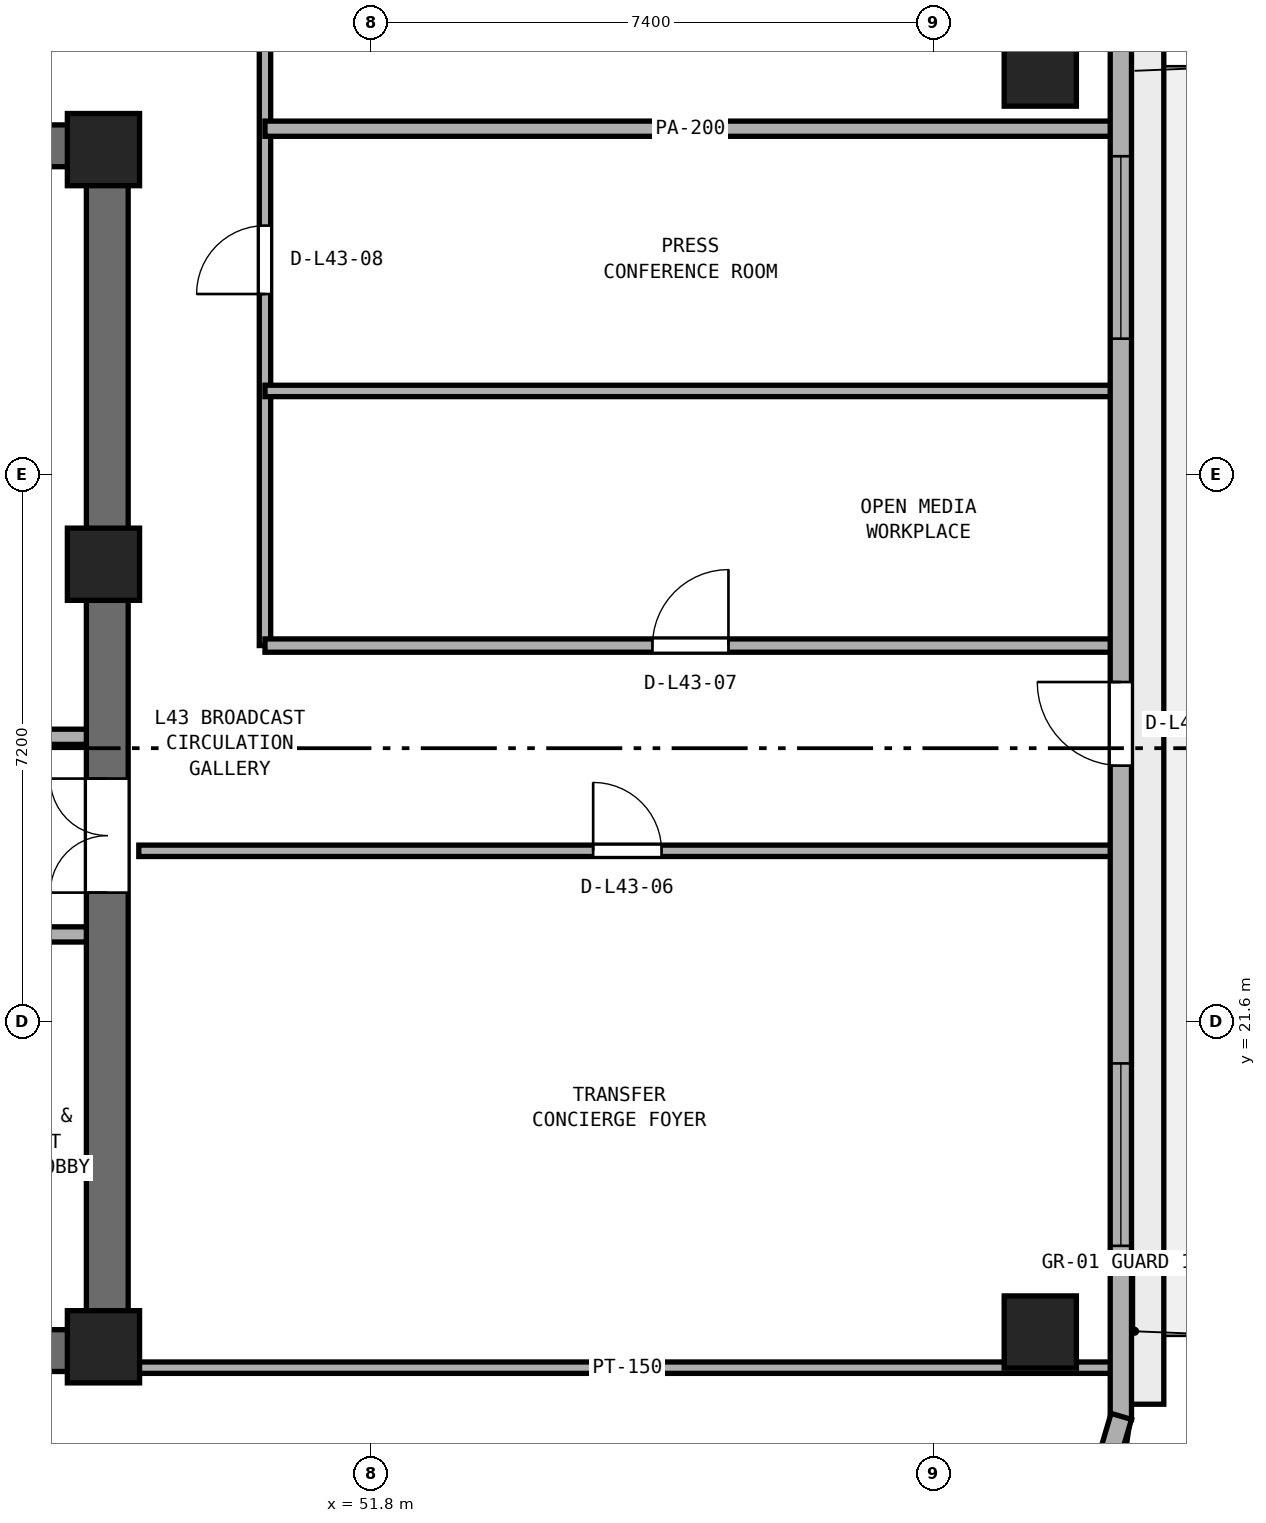
"""IFC4 building model, lengths in metres.
Left out: names, types, materials, properties, quantities, classifications, styles, units other than length and angle.
Written with IfcOpenShell. Run it as: python <this file> out.ifc"""

import sys

from ifc_helpers import new_model, si_unit, direction, frame, frame_2d, origin, origin_2d, place, context, subcontext, project, spatial, rectangle, extrude, element, fill, save


model = new_model("IFC4")
c1 = context("Model", 3, precision=1e-05, world=origin(), true_north=direction((0.0, 1.0)))
c2 = subcontext(c1, "Body", "Model", "MODEL_VIEW")
j1 = project(units=[si_unit("LENGTHUNIT", "METRE"), si_unit("PLANEANGLEUNIT", "RADIAN")], contexts=[c1])
p1 = place(None, origin())
s1 = spatial("IfcSite", under=j1, at=p1, CompositionType="ELEMENT")
p2 = place(p1, origin())
s2 = spatial("IfcBuilding", under=s1, at=p2, CompositionType="ELEMENT")
p3 = place(p2, frame((0.0, 0.0, 170.6)))
s3 = spatial("IfcBuildingStorey", under=s2, at=p3, CompositionType="ELEMENT", Elevation=170.6)
for number, where, z_axis, x_axis in (
    (1, (25.4, 17.275, 0.0), (0.0, 0.0, 1.0), (1.0, 0.0, 0.0)),
    (2, (25.4, 33.125, 0.0), (0.0, 0.0, 1.0), (1.0, 0.0, 0.0)),
):
    element("IfcWall", number, at=place(p3, frame(where, z_axis=z_axis, x_axis=x_axis)), inside=s3, PredefinedType="SHEAR", context=c2, shape_type="SweptSolid", body=[
        extrude(rectangle(XDim=23.2, YDim=0.55, at=frame_2d((11.6, 0.0))), origin(), (0.0, 0.0, 1.0), 3.54),
    ])
p4 = place(p3, frame((48.325, 17.55, 0.0), z_axis=(0.0, 0.0, 1.0), x_axis=(0.0, 1.0, 0.0)))
e3 = element("IfcWall", 3, at=p4, inside=s3, PredefinedType="SHEAR", context=c2, shape_type="SweptSolid", body=[
    extrude(rectangle(XDim=15.3, YDim=0.55, at=frame_2d((7.65, 0.0))), origin(), (0.0, 0.0, 1.0), 3.54),
])
p5 = place(p4, frame((5.75, 0.0, 0.0)))
e4 = element("IfcOpeningElement", 4, at=p5, cuts=e3, PredefinedType="OPENING", context=c2, shape_type="SweptSolid", body=[
    extrude(rectangle(XDim=1.5, YDim=2.15, at=frame_2d((0.75, 1.075))), frame((0.0, 0.285, 0.0), z_axis=(0.0, -1.0, 0.0), x_axis=(1.0, 0.0, 0.0)), (0.0, 0.0, 1.0), 0.57),
])
for number, where, z_axis, x_axis in (
    (5, (48.275, 17.325, 0.0), (0.0, 0.0, 1.0), (1.0, 0.0, 0.0)),
    (6, (48.275, 27.62, 0.0), (0.0, 0.0, 1.0), (1.0, 0.0, 0.0)),
    (7, (48.275, 33.075, 0.0), (0.0, 0.0, 1.0), (1.0, 0.0, 0.0)),
):
    element("IfcColumn", number, at=place(p3, frame(where, z_axis=z_axis, x_axis=x_axis)), inside=s3, PredefinedType="PILASTER", context=c2, shape_type="SweptSolid", body=[
        extrude(rectangle(XDim=0.95, YDim=0.95, at=origin_2d()), origin(), (0.0, 0.0, 1.0), 3.8),
    ])
for number, where, z_axis, x_axis in (
    (8, (60.6, 17.519, 0.0), (0.0, 0.0, 1.0), (1.0, 0.0, 0.0)),
    (9, (60.6, 34.122, 0.0), (0.0, 0.0, 1.0), (1.0, 0.0, 0.0)),
):
    element("IfcColumn", number, at=place(p3, frame(where, z_axis=z_axis, x_axis=x_axis)), inside=s3, PredefinedType="COLUMN", context=c2, shape_type="SweptSolid", body=[
        extrude(rectangle(XDim=0.95, YDim=0.95, at=origin_2d()), origin(), (0.0, 0.0, 1.0), 3.8),
    ])
p6 = place(p3, frame((42.0, 22.75, 0.0), z_axis=(0.0, 0.0, 1.0), x_axis=(1.0, 0.0, 0.0)))
e10 = element("IfcWall", 10, at=p6, inside=s3, PredefinedType="SOLIDWALL", context=c2, shape_type="SweptSolid", body=[
    extrude(rectangle(XDim=6.05, YDim=0.2, at=frame_2d((3.025, 0.0))), origin(), (0.0, 0.0, 1.0), 3.54),
])
p7 = place(p3, frame((46.1, 25.35, 0.0), z_axis=(0.0, 0.0, 1.0), x_axis=(1.0, 0.0, 0.0)))
e11 = element("IfcWall", 11, at=p7, inside=s3, PredefinedType="SOLIDWALL", context=c2, shape_type="SweptSolid", body=[
    extrude(rectangle(XDim=1.95, YDim=0.2, at=frame_2d((0.975, 0.0))), origin(), (0.0, 0.0, 1.0), 3.54),
])
p8 = place(p3, frame((50.4, 26.55, 0.0), z_axis=(0.0, 0.0, 1.0), x_axis=(0.0, 1.0, 0.0)))
e12 = element("IfcWall", 12, at=p8, inside=s3, PredefinedType="PARTITIONING", context=c2, shape_type="SweptSolid", body=[
    extrude(rectangle(XDim=8.65, YDim=0.15, at=frame_2d((4.325, 0.0))), origin(), (0.0, 0.0, 1.0), 3.54),
])
p9 = place(p8, frame((4.625, 0.0, 0.0)))
e13 = element("IfcOpeningElement", 13, at=p9, cuts=e12, PredefinedType="OPENING", context=c2, shape_type="SweptSolid", body=[
    extrude(rectangle(XDim=0.9, YDim=2.1, at=frame_2d((0.45, 1.05))), frame((0.0, 0.085, 0.0), z_axis=(0.0, -1.0, 0.0), x_axis=(1.0, 0.0, 0.0)), (0.0, 0.0, 1.0), 0.17),
])
p10 = place(p3, frame((48.74, 17.05, 0.0), z_axis=(0.0, 0.0, 1.0), x_axis=(1.0, 0.0, 0.0)))
e14 = element("IfcWall", 14, at=p10, inside=s3, PredefinedType="PARTITIONING", context=c2, shape_type="SweptSolid", body=[
    extrude(rectangle(XDim=12.855, YDim=0.15, at=frame_2d((6.427, 0.0))), origin(), (0.0, 0.0, 1.0), 2.923),
])
p11 = place(p3, frame((48.74, 23.85, 0.0), z_axis=(0.0, 0.0, 1.0), x_axis=(1.0, 0.0, 0.0)))
e15 = element("IfcWall", 15, at=p11, inside=s3, PredefinedType="PARTITIONING", context=c2, shape_type="SweptSolid", body=[
    extrude(rectangle(XDim=12.855, YDim=0.15, at=frame_2d((6.427, 0.0))), origin(), (0.0, 0.0, 1.0), 3.54),
])
p12 = place(p11, frame((5.978, 0.0, 0.0)))
e16 = element("IfcOpeningElement", 16, at=p12, cuts=e15, PredefinedType="OPENING", context=c2, shape_type="SweptSolid", body=[
    extrude(rectangle(XDim=0.9, YDim=2.1, at=frame_2d((0.45, 1.05))), frame((0.0, 0.085, 0.0), z_axis=(0.0, -1.0, 0.0), x_axis=(1.0, 0.0, 0.0)), (0.0, 0.0, 1.0), 0.17),
])
p13 = place(p3, frame((50.4, 26.55, 0.0), z_axis=(0.0, 0.0, 1.0), x_axis=(1.0, 0.0, 0.0)))
e17 = element("IfcWall", 17, at=p13, inside=s3, PredefinedType="PARTITIONING", context=c2, shape_type="SweptSolid", body=[
    extrude(rectangle(XDim=11.195, YDim=0.175, at=frame_2d((5.598, 0.0))), origin(), (0.0, 0.0, 1.0), 3.54),
])
p14 = place(p13, frame((5.097, 0.0, 0.0)))
e18 = element("IfcOpeningElement", 18, at=p14, cuts=e17, PredefinedType="OPENING", context=c2, shape_type="SweptSolid", body=[
    extrude(rectangle(XDim=1.0, YDim=2.12, at=frame_2d((0.5, 1.06))), frame((0.0, 0.097, 0.0), z_axis=(0.0, -1.0, 0.0), x_axis=(1.0, 0.0, 0.0)), (0.0, 0.0, 1.0), 0.195),
])
p15 = place(p3, frame((50.4, 29.9, 0.0), z_axis=(0.0, 0.0, 1.0), x_axis=(1.0, 0.0, 0.0)))
e19 = element("IfcWall", 19, at=p15, inside=s3, PredefinedType="PARTITIONING", context=c2, shape_type="SweptSolid", body=[
    extrude(rectangle(XDim=11.195, YDim=0.15, at=frame_2d((5.598, 0.0))), origin(), (0.0, 0.0, 1.0), 3.54),
])
p16 = place(p3, frame((50.4, 33.35, 0.0), z_axis=(0.0, 0.0, 1.0), x_axis=(1.0, 0.0, 0.0)))
e20 = element("IfcWall", 20, at=p16, inside=s3, PredefinedType="PARTITIONING", context=c2, shape_type="SweptSolid", body=[
    extrude(rectangle(XDim=11.195, YDim=0.2, at=frame_2d((5.598, 0.0))), origin(), (0.0, 0.0, 1.0), 2.923),
])
p17 = place(p3, frame((61.66, 16.369, 0.0), z_axis=(0.0, 0.0, 1.0), x_axis=(0.0, 1.0, 0.0)))
e21 = element("IfcWall", 21, at=p17, inside=s3, PredefinedType="STANDARD", context=c2, shape_type="SweptSolid", body=[
    extrude(rectangle(XDim=18.902, YDim=0.28, at=frame_2d((9.451, 0.0))), origin(), (0.0, 0.0, 1.0), 3.54),
])
p18 = place(p17, frame((8.601, 0.0, 0.0)))
e22 = element("IfcOpeningElement", 22, at=p18, cuts=e21, PredefinedType="OPENING", context=c2, shape_type="SweptSolid", body=[
    extrude(rectangle(XDim=1.1, YDim=2.2, at=frame_2d((0.55, 1.1))), frame((0.0, 0.15, 0.0), z_axis=(0.0, -1.0, 0.0), x_axis=(1.0, 0.0, 0.0)), (0.0, 0.0, 1.0), 0.3),
])
p19 = place(p17, frame((2.284, 0.0, 0.9)))
e23 = element("IfcOpeningElement", 23, at=p19, cuts=e21, PredefinedType="OPENING", context=c2, shape_type="SweptSolid", body=[
    extrude(rectangle(XDim=2.4, YDim=1.75, at=frame_2d((1.2, 0.875))), frame((0.0, 0.15, 0.0), z_axis=(0.0, -1.0, 0.0), x_axis=(1.0, 0.0, 0.0)), (0.0, 0.0, 1.0), 0.3),
])
p20 = place(p17, frame((14.219, 0.0, 0.9)))
e24 = element("IfcOpeningElement", 24, at=p20, cuts=e21, PredefinedType="OPENING", context=c2, shape_type="SweptSolid", body=[
    extrude(rectangle(XDim=2.4, YDim=1.75, at=frame_2d((1.2, 0.875))), frame((0.0, 0.15, 0.0), z_axis=(0.0, -1.0, 0.0), x_axis=(1.0, 0.0, 0.0)), (0.0, 0.0, 1.0), 0.3),
])
p21 = place(p3, frame((61.086, 14.45, 0.0), z_axis=(0.0, 0.0, 1.0), x_axis=(0.283660953453, 0.958924639107, 0.0)))
e25 = element("IfcWall", 25, at=p21, inside=s3, PredefinedType="STANDARD", context=c2, shape_type="SweptSolid", body=[
    extrude(rectangle(XDim=2.042, YDim=0.28, at=frame_2d((1.021, 0.0))), origin(), (0.0, 0.0, 1.0), 3.54),
])
p22 = place(p5, origin())
e26 = element("IfcDoor", 26, at=p22, inside=s3, OperationType="DOUBLE_DOOR_SINGLE_SWING", PredefinedType="DOOR", context=c2, shape_type="SweptSolid", body=[
    extrude(rectangle(XDim=1.5, YDim=2.15, at=frame_2d((0.75, 1.075))), frame((0.0, 0.025, 0.0), z_axis=(0.0, -1.0, 0.0), x_axis=(1.0, 0.0, 0.0)), (0.0, 0.0, 1.0), 0.05),
])
fill(e4, e26)
p23 = place(p12, origin())
e27 = element("IfcDoor", 27, at=p23, inside=s3, OperationType="SINGLE_SWING_LEFT", PredefinedType="DOOR", context=c2, shape_type="SweptSolid", body=[
    extrude(rectangle(XDim=0.9, YDim=2.1, at=frame_2d((0.45, 1.05))), frame((0.0, 0.025, 0.0), z_axis=(0.0, -1.0, 0.0), x_axis=(1.0, 0.0, 0.0)), (0.0, 0.0, 1.0), 0.05),
])
fill(e16, e27)
p24 = place(p14, origin())
e28 = element("IfcDoor", 28, at=p24, inside=s3, OperationType="SINGLE_SWING_RIGHT", PredefinedType="DOOR", context=c2, shape_type="SweptSolid", body=[
    extrude(rectangle(XDim=1.0, YDim=2.12, at=frame_2d((0.5, 1.06))), frame((0.0, 0.025, 0.0), z_axis=(0.0, -1.0, 0.0), x_axis=(1.0, 0.0, 0.0)), (0.0, 0.0, 1.0), 0.05),
])
fill(e18, e28)
p25 = place(p9, origin())
e29 = element("IfcDoor", 29, at=p25, inside=s3, OperationType="SINGLE_SWING_LEFT", PredefinedType="DOOR", context=c2, shape_type="SweptSolid", body=[
    extrude(rectangle(XDim=0.9, YDim=2.1, at=frame_2d((0.45, 1.05))), frame((0.0, 0.025, 0.0), z_axis=(0.0, -1.0, 0.0), x_axis=(1.0, 0.0, 0.0)), (0.0, 0.0, 1.0), 0.05),
])
fill(e13, e29)
p26 = place(p18, origin())
e30 = element("IfcDoor", 30, at=p26, inside=s3, OperationType="SINGLE_SWING_RIGHT", PredefinedType="DOOR", context=c2, shape_type="SweptSolid", body=[
    extrude(rectangle(XDim=1.1, YDim=2.2, at=frame_2d((0.55, 1.1))), frame((0.0, 0.025, 0.0), z_axis=(0.0, -1.0, 0.0), x_axis=(1.0, 0.0, 0.0)), (0.0, 0.0, 1.0), 0.05),
])
fill(e22, e30)
p27 = place(p19, origin())
e31 = element("IfcWindow", 31, at=p27, inside=s3, PartitioningType="SINGLE_PANEL", PredefinedType="WINDOW", context=c2, shape_type="SweptSolid", body=[
    extrude(rectangle(XDim=2.4, YDim=1.75, at=frame_2d((1.2, 0.875))), frame((0.0, 0.03, 0.0), z_axis=(0.0, -1.0, 0.0), x_axis=(1.0, 0.0, 0.0)), (0.0, 0.0, 1.0), 0.06),
])
fill(e23, e31)
p28 = place(p20, origin())
e32 = element("IfcWindow", 32, at=p28, inside=s3, PartitioningType="SINGLE_PANEL", PredefinedType="WINDOW", context=c2, shape_type="SweptSolid", body=[
    extrude(rectangle(XDim=2.4, YDim=1.75, at=frame_2d((1.2, 0.875))), frame((0.0, 0.03, 0.0), z_axis=(0.0, -1.0, 0.0), x_axis=(1.0, 0.0, 0.0)), (0.0, 0.0, 1.0), 0.06),
])
fill(e24, e32)
save(model, sys.argv[1])
